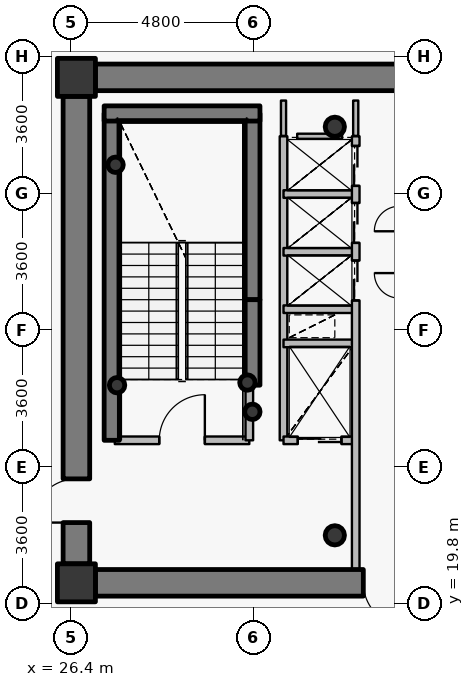
"""IFC4 building model, lengths in metres.
Left out: names, types, materials, properties, quantities, classifications, styles, units other than length and angle.
Written with IfcOpenShell. Run it as: python <this file> out.ifc"""

import sys

from ifc_helpers import new_model, si_unit, direction, frame, frame_2d, origin, origin_2d, place, context, subcontext, project, spatial, rectangle, hollow_circle, extrude, source, transform, mapped, element, fill, save


model = new_model("IFC4")
c1 = context("Model", 3, precision=1e-05, world=origin(), true_north=direction((0.0, 1.0)))
c2 = subcontext(c1, "Body", "Model", "MODEL_VIEW")
j1 = project(units=[si_unit("LENGTHUNIT", "METRE"), si_unit("PLANEANGLEUNIT", "RADIAN")], contexts=[c1])
p1 = place(None, origin())
s1 = spatial("IfcSite", under=j1, at=p1, CompositionType="ELEMENT")
p2 = place(p1, origin())
s2 = spatial("IfcBuilding", under=s1, at=p2, CompositionType="ELEMENT")
p3 = place(p2, frame((0.0, 0.0, 225.3)))
s3 = spatial("IfcBuildingStorey", under=s2, at=p3, CompositionType="ELEMENT", Elevation=225.3)
for number, where, z_axis, x_axis in (
    (1, (26.55, 20.35, 0.0), (0.0, 0.0, 1.0), (1.0, 0.0, 0.0)),
    (2, (26.55, 33.65, 0.0), (0.0, 0.0, 1.0), (1.0, 0.0, 0.0)),
):
    element("IfcColumn", number, at=place(p3, frame(where, z_axis=z_axis, x_axis=x_axis)), inside=s3, PredefinedType="COLUMN", context=c2, shape_type="SweptSolid", body=[
        extrude(rectangle(XDim=1.0, YDim=1.0, at=origin_2d()), origin(), (0.0, 0.0, 1.0), 3.75),
    ])
for number, where, z_axis, x_axis in (
    (3, (33.35, 21.6, 0.0), (0.0, 0.0, 1.0), (1.0, 0.0, 0.0)),
    (4, (33.35, 32.35, 0.0), (0.0, 0.0, 1.0), (1.0, 0.0, 0.0)),
):
    element("IfcColumn", number, at=place(p3, frame(where, z_axis=z_axis, x_axis=x_axis)), inside=s3, PredefinedType="COLUMN", context=c2, shape_type="SweptSolid", body=[
        extrude(hollow_circle(Radius=0.254, WallThickness=0.02, at=origin_2d()), origin(), (0.0, 0.0, 1.0), 3.75),
    ])
p4 = place(p3, frame((27.48, 24.1, 0.0), z_axis=(0.0, 0.0, 1.0), x_axis=(0.0, 1.0, 0.0)))
e5 = element("IfcWall", 5, at=p4, inside=s3, PredefinedType="SHEAR", context=c2, shape_type="SweptSolid", body=[
    extrude(rectangle(XDim=8.6, YDim=0.4, at=frame_2d((4.3, 0.0))), origin(), (0.0, 0.0, 1.0), 3.75),
])
p5 = place(p3, frame((31.18, 27.8, 0.0), z_axis=(0.0, 0.0, 1.0), x_axis=(0.0, 1.0, 0.0)))
e6 = element("IfcWall", 6, at=p5, inside=s3, PredefinedType="SHEAR", context=c2, shape_type="SweptSolid", body=[
    extrude(rectangle(XDim=4.9, YDim=0.4, at=frame_2d((2.45, 0.0))), origin(), (0.0, 0.0, 1.0), 3.75),
])
p6 = place(p3, frame((27.28, 32.7, 0.0), z_axis=(0.0, 0.0, 1.0), x_axis=(1.0, 0.0, 0.0)))
e7 = element("IfcWall", 7, at=p6, inside=s3, PredefinedType="SHEAR", context=c2, shape_type="SweptSolid", body=[
    extrude(rectangle(XDim=4.1, YDim=0.4, at=frame_2d((2.05, 0.0))), origin(), (0.0, 0.0, 1.0), 3.75),
])
for number, where, z_axis, x_axis in (
    (8, (27.58, 31.35, 0.0), (0.0, 0.0, 1.0), (1.0, 0.0, 0.0)),
    (9, (31.05, 25.62, 0.0), (0.0, 0.0, 1.0), (1.0, 0.0, 0.0)),
    (10, (31.18, 24.85, 0.0), (0.0, 0.0, 1.0), (1.0, 0.0, 0.0)),
    (11, (27.62, 25.55, 0.0), (0.0, 0.0, 1.0), (1.0, 0.0, 0.0)),
):
    element("IfcColumn", number, at=place(p3, frame(where, z_axis=z_axis, x_axis=x_axis)), inside=s3, PredefinedType="COLUMN", context=c2, shape_type="SweptSolid", body=[
        extrude(hollow_circle(Radius=0.203, WallThickness=0.016, at=origin_2d()), origin(), (0.0, 0.0, 1.0), 3.75),
    ])
p7 = place(p3, frame((27.05, 33.65, 0.0), z_axis=(0.0, 0.0, 1.0), x_axis=(1.0, 0.0, 0.0)))
e12 = element("IfcWall", 12, at=p7, inside=s3, PredefinedType="SHEAR", context=c2, shape_type="SweptSolid", body=[
    extrude(rectangle(XDim=17.9, YDim=0.7, at=frame_2d((8.95, 0.0))), origin(), (0.0, 0.0, 1.0), 3.05),
])
p8 = place(p7, frame((13.675, 0.0, 0.0)))
e13 = element("IfcOpeningElement", 13, at=p8, cuts=e12, PredefinedType="OPENING", context=c2, shape_type="SweptSolid", body=[
    extrude(rectangle(XDim=1.15, YDim=2.15, at=origin_2d()), frame((0.575, 0.36, 1.075), z_axis=(0.0, -1.0, 0.0), x_axis=(1.0, 0.0, 0.0)), (0.0, 0.0, 1.0), 0.72),
])
p9 = place(p3, frame((44.95, 20.35, 0.0), z_axis=(0.0, 0.0, 1.0), x_axis=(-1.0, 0.0, 0.0)))
e14 = element("IfcWall", 14, at=p9, inside=s3, PredefinedType="SHEAR", context=c2, shape_type="SweptSolid", body=[
    extrude(rectangle(XDim=17.9, YDim=0.7, at=frame_2d((8.95, 0.0))), origin(), (0.0, 0.0, 1.0), 3.05),
])
p10 = place(p9, frame((9.7, 0.0, 0.0)))
e15 = element("IfcOpeningElement", 15, at=p10, cuts=e14, PredefinedType="OPENING", context=c2, shape_type="SweptSolid", body=[
    extrude(rectangle(XDim=1.15, YDim=2.15, at=origin_2d()), frame((0.575, 0.36, 1.075), z_axis=(0.0, -1.0, 0.0), x_axis=(1.0, 0.0, 0.0)), (0.0, 0.0, 1.0), 0.72),
])
p11 = place(p3, frame((26.55, 20.85, 0.0), z_axis=(0.0, 0.0, 1.0), x_axis=(0.0, 1.0, 0.0)))
e16 = element("IfcWall", 16, at=p11, inside=s3, PredefinedType="SHEAR", context=c2, shape_type="SweptSolid", body=[
    extrude(rectangle(XDim=12.3, YDim=0.7, at=frame_2d((6.15, 0.0))), origin(), (0.0, 0.0, 1.0), 3.05),
])
p12 = place(p11, frame((1.085, 0.0, 0.0)))
e17 = element("IfcOpeningElement", 17, at=p12, cuts=e16, PredefinedType="OPENING", context=c2, shape_type="SweptSolid", body=[
    extrude(rectangle(XDim=1.15, YDim=2.15, at=origin_2d()), frame((0.575, 0.36, 1.075), z_axis=(0.0, -1.0, 0.0), x_axis=(1.0, 0.0, 0.0)), (0.0, 0.0, 1.0), 0.72),
])
p13 = place(p3, frame((31.18, 25.55, 0.0), z_axis=(0.0, 0.0, 1.0), x_axis=(0.0, 1.0, 0.0)))
e18 = element("IfcWall", 18, at=p13, inside=s3, PredefinedType="SHEAR", context=c2, shape_type="SweptSolid", body=[
    extrude(rectangle(XDim=2.25, YDim=0.4, at=frame_2d((1.125, 0.0))), origin(), (0.0, 0.0, 1.0), 3.1),
])
p14 = place(p3, frame((27.56, 24.1, 0.0), z_axis=(0.0, 0.0, 1.0), x_axis=(1.0, 0.0, 0.0)))
e19 = element("IfcWall", 19, at=p14, inside=s3, PredefinedType="PARTITIONING", context=c2, shape_type="SweptSolid", body=[
    extrude(rectangle(XDim=3.54, YDim=0.2, at=frame_2d((1.77, 0.0))), origin(), (0.0, 0.0, 1.0), 3.5),
])
p15 = place(p14, frame((1.17, 0.0, 0.0)))
e20 = element("IfcOpeningElement", 20, at=p15, cuts=e19, PredefinedType="OPENING", context=c2, shape_type="SweptSolid", body=[
    extrude(rectangle(XDim=1.2, YDim=2.15, at=origin_2d()), frame((0.6, 0.11, 1.075), z_axis=(0.0, -1.0, 0.0), x_axis=(1.0, 0.0, 0.0)), (0.0, 0.0, 1.0), 0.22),
])
p16 = place(p3, frame((31.1, 24.1, 0.0), z_axis=(0.0, 0.0, 1.0), x_axis=(0.0, 1.0, 0.0)))
e21 = element("IfcWall", 21, at=p16, inside=s3, PredefinedType="PARTITIONING", context=c2, shape_type="SweptSolid", body=[
    extrude(rectangle(XDim=1.44, YDim=0.2, at=frame_2d((0.72, 0.0))), origin(), (0.0, 0.0, 1.0), 3.5),
])
p17 = place(p3, frame((32.0, 24.1, 0.0), z_axis=(0.0, 0.0, 1.0), x_axis=(0.0, 1.0, 0.0)))
e22 = element("IfcWall", 22, at=p17, inside=s3, PredefinedType="PARTITIONING", context=c2, shape_type="SweptSolid", body=[
    extrude(rectangle(XDim=8.0, YDim=0.2, at=frame_2d((4.0, 0.0))), origin(), (0.0, 0.0, 1.0), 3.5),
])
p18 = place(p3, frame((32.0, 24.1, 0.0), z_axis=(0.0, 0.0, 1.0), x_axis=(1.0, 0.0, 0.0)))
e23 = element("IfcWall", 23, at=p18, inside=s3, PredefinedType="PARTITIONING", context=c2, shape_type="SweptSolid", body=[
    extrude(rectangle(XDim=1.9, YDim=0.2, at=frame_2d((0.95, 0.0))), origin(), (0.0, 0.0, 1.0), 3.085),
])
p19 = place(p18, frame((0.375, 0.0, 0.0)))
e24 = element("IfcOpeningElement", 24, at=p19, cuts=e23, PredefinedType="OPENING", context=c2, shape_type="SweptSolid", body=[
    extrude(rectangle(XDim=1.15, YDim=2.15, at=origin_2d()), frame((0.575, 0.11, 1.075), z_axis=(0.0, -1.0, 0.0), x_axis=(1.0, 0.0, 0.0)), (0.0, 0.0, 1.0), 0.22),
])
for number, where, z_axis, x_axis in (
    (25, (32.0, 26.65, 0.0), (0.0, 0.0, 1.0), (1.0, 0.0, 0.0)),
    (26, (32.0, 27.55, 0.0), (0.0, 0.0, 1.0), (1.0, 0.0, 0.0)),
    (27, (32.0, 29.06, 0.0), (0.0, 0.0, 1.0), (1.0, 0.0, 0.0)),
    (28, (32.0, 30.58, 0.0), (0.0, 0.0, 1.0), (1.0, 0.0, 0.0)),
):
    element("IfcWall", number, at=place(p3, frame(where, z_axis=z_axis, x_axis=x_axis)), inside=s3, PredefinedType="PARTITIONING", context=c2, shape_type="SweptSolid", body=[
        extrude(rectangle(XDim=1.9, YDim=0.2, at=frame_2d((0.95, 0.0))), origin(), (0.0, 0.0, 1.0), 3.085),
    ])
p20 = place(p3, frame((33.9, 20.7, 0.0), z_axis=(0.0, 0.0, 1.0), x_axis=(0.0, 1.0, 0.0)))
e29 = element("IfcWall", 29, at=p20, inside=s3, PredefinedType="PARTITIONING", context=c2, shape_type="SweptSolid", body=[
    extrude(rectangle(XDim=11.4, YDim=0.2, at=frame_2d((5.7, 0.0))), origin(), (0.0, 0.0, 1.0), 3.085),
])
p21 = place(p20, frame((7.08, 0.0, 0.0)))
e30 = element("IfcOpeningElement", 30, at=p21, cuts=e29, PredefinedType="OPENING", context=c2, shape_type="SweptSolid", body=[
    extrude(rectangle(XDim=1.05, YDim=2.15, at=origin_2d()), frame((0.525, 0.11, 1.075), z_axis=(0.0, -1.0, 0.0), x_axis=(1.0, 0.0, 0.0)), (0.0, 0.0, 1.0), 0.22),
])
p22 = place(p20, frame((8.595, 0.0, 0.0)))
e31 = element("IfcOpeningElement", 31, at=p22, cuts=e29, PredefinedType="OPENING", context=c2, shape_type="SweptSolid", body=[
    extrude(rectangle(XDim=1.05, YDim=2.15, at=origin_2d()), frame((0.525, 0.11, 1.075), z_axis=(0.0, -1.0, 0.0), x_axis=(1.0, 0.0, 0.0)), (0.0, 0.0, 1.0), 0.22),
])
p23 = place(p20, frame((10.095, 0.0, 0.0)))
e32 = element("IfcOpeningElement", 32, at=p23, cuts=e29, PredefinedType="OPENING", context=c2, shape_type="SweptSolid", body=[
    extrude(rectangle(XDim=1.05, YDim=2.15, at=origin_2d()), frame((0.525, 0.11, 1.075), z_axis=(0.0, -1.0, 0.0), x_axis=(1.0, 0.0, 0.0)), (0.0, 0.0, 1.0), 0.22),
])
p24 = place(p3, frame((32.36, 32.1, 0.0), z_axis=(0.0, 0.0, 1.0), x_axis=(1.0, 0.0, 0.0)))
e33 = element("IfcWall", 33, at=p24, inside=s3, PredefinedType="PARTITIONING", context=c2, shape_type="SweptSolid", body=[
    extrude(rectangle(XDim=1.18, YDim=0.135, at=frame_2d((0.59, 0.0))), origin(), (0.0, 0.0, 1.0), 3.085),
])
p25 = place(p3, frame((32.0, 33.04, 0.0), z_axis=(0.0, 0.0, 1.0), x_axis=(0.0, -1.0, 0.0)))
e34 = element("IfcWall", 34, at=p25, inside=s3, PredefinedType="PARTITIONING", context=c2, shape_type="SweptSolid", body=[
    extrude(rectangle(XDim=0.93, YDim=0.135, at=frame_2d((0.465, 0.0))), origin(), (0.0, 0.0, 1.0), 3.035),
])
p26 = place(p3, frame((33.9, 32.11, 0.0), z_axis=(0.0, 0.0, 1.0), x_axis=(0.0, 1.0, 0.0)))
e35 = element("IfcWall", 35, at=p26, inside=s3, PredefinedType="PARTITIONING", context=c2, shape_type="SweptSolid", body=[
    extrude(rectangle(XDim=0.93, YDim=0.135, at=frame_2d((0.465, 0.0))), origin(), (0.0, 0.0, 1.0), 3.085),
])
p27 = place(p3, frame((27.04, 34.0, 0.0), z_axis=(0.0, 0.0, 1.0), x_axis=(-1.0, 0.0, 0.0)))
e36 = element("IfcWall", 36, at=p27, inside=s3, PredefinedType="PARTITIONING", context=c2, shape_type="SweptSolid", body=[
    extrude(rectangle(XDim=0.84, YDim=0.135, at=frame_2d((0.42, 0.0))), origin(), (0.0, 0.0, 1.0), 2.935),
])
p28 = place(p3, frame((26.2, 33.692, 0.0), z_axis=(0.0, 0.0, 1.0), x_axis=(0.0, -1.0, 0.0)))
e37 = element("IfcWall", 37, at=p28, inside=s3, PredefinedType="PARTITIONING", context=c2, shape_type="SweptSolid", body=[
    extrude(rectangle(XDim=0.532, YDim=0.135, at=frame_2d((0.266, 0.0))), origin(), (0.0, 0.0, 1.0), 3.5),
])
p29 = place(p3, frame((26.2, 20.84, 0.0), z_axis=(0.0, 0.0, 1.0), x_axis=(0.0, -1.0, 0.0)))
e38 = element("IfcWall", 38, at=p29, inside=s3, PredefinedType="PARTITIONING", context=c2, shape_type="SweptSolid", body=[
    extrude(rectangle(XDim=0.84, YDim=0.135, at=frame_2d((0.42, 0.0))), origin(), (0.0, 0.0, 1.0), 3.5),
])
p30 = place(p3, frame((26.508, 20.0, 0.0), z_axis=(0.0, 0.0, 1.0), x_axis=(1.0, 0.0, 0.0)))
e39 = element("IfcWall", 39, at=p30, inside=s3, PredefinedType="PARTITIONING", context=c2, shape_type="SweptSolid", body=[
    extrude(rectangle(XDim=0.532, YDim=0.135, at=frame_2d((0.266, 0.0))), origin(), (0.0, 0.0, 1.0), 2.935),
])
m1 = source(origin(), c2, "Body", "SweptSolid", [
    extrude(rectangle(XDim=1.15, YDim=2.15, at=origin_2d()), frame((0.575, 0.025, 1.075), z_axis=(0.0, -1.0, 0.0), x_axis=(1.0, 0.0, 0.0)), (0.0, 0.0, 1.0), 0.05),
])
p31 = place(p12, origin())
e40 = element("IfcDoor", 40, at=p31, inside=s3, OperationType="SINGLE_SWING_LEFT", PredefinedType="DOOR", context=c2, shape_type="MappedRepresentation", body=[
    mapped(m1, transform((0.0, 0.0, 0.0), x_axis=(1.0, 0.0, 0.0), y_axis=(0.0, 1.0, 0.0), z_axis=(0.0, 0.0, 1.0), scale=1.0)),
])
fill(e17, e40)
p32 = place(p10, origin())
e41 = element("IfcDoor", 41, at=p32, inside=s3, OperationType="SINGLE_SWING_LEFT", PredefinedType="DOOR", context=c2, shape_type="MappedRepresentation", body=[
    mapped(m1, transform((0.0, 0.0, 0.0), x_axis=(1.0, 0.0, 0.0), y_axis=(0.0, 1.0, 0.0), z_axis=(0.0, 0.0, 1.0), scale=1.0)),
])
fill(e15, e41)
m2 = source(origin(), c2, "Body", "SweptSolid", [
    extrude(rectangle(XDim=1.2, YDim=2.15, at=origin_2d()), frame((0.6, 0.025, 1.075), z_axis=(0.0, -1.0, 0.0), x_axis=(1.0, 0.0, 0.0)), (0.0, 0.0, 1.0), 0.05),
])
p33 = place(p15, origin())
e42 = element("IfcDoor", 42, at=p33, inside=s3, OperationType="SINGLE_SWING_RIGHT", PredefinedType="DOOR", context=c2, shape_type="MappedRepresentation", body=[
    mapped(m2, transform((0.0, 0.0, 0.0), x_axis=(1.0, 0.0, 0.0), y_axis=(0.0, 1.0, 0.0), z_axis=(0.0, 0.0, 1.0), scale=1.0)),
])
fill(e20, e42)
m3 = source(origin(), c2, "Body", "SweptSolid", [
    extrude(rectangle(XDim=1.15, YDim=2.15, at=origin_2d()), frame((0.575, 0.025, 1.075), z_axis=(0.0, -1.0, 0.0), x_axis=(1.0, 0.0, 0.0)), (0.0, 0.0, 1.0), 0.05),
])
p34 = place(p19, origin())
e43 = element("IfcDoor", 43, at=p34, inside=s3, OperationType="DOUBLE_DOOR_SLIDING", PredefinedType="USERDEFINED", context=c2, shape_type="MappedRepresentation", body=[
    mapped(m3, transform((0.0, 0.0, 0.0), x_axis=(1.0, 0.0, 0.0), y_axis=(0.0, 1.0, 0.0), z_axis=(0.0, 0.0, 1.0), scale=1.0)),
])
fill(e24, e43)
m4 = source(origin(), c2, "Body", "SweptSolid", [
    extrude(rectangle(XDim=1.05, YDim=2.15, at=origin_2d()), frame((0.525, 0.025, 1.075), z_axis=(0.0, -1.0, 0.0), x_axis=(1.0, 0.0, 0.0)), (0.0, 0.0, 1.0), 0.05),
])
p35 = place(p21, origin())
e44 = element("IfcDoor", 44, at=p35, inside=s3, OperationType="DOUBLE_DOOR_SLIDING", PredefinedType="USERDEFINED", context=c2, shape_type="MappedRepresentation", body=[
    mapped(m4, transform((0.0, 0.0, 0.0), x_axis=(1.0, 0.0, 0.0), y_axis=(0.0, 1.0, 0.0), z_axis=(0.0, 0.0, 1.0), scale=1.0)),
])
fill(e30, e44)
p36 = place(p22, origin())
e45 = element("IfcDoor", 45, at=p36, inside=s3, OperationType="DOUBLE_DOOR_SLIDING", PredefinedType="USERDEFINED", context=c2, shape_type="MappedRepresentation", body=[
    mapped(m4, transform((0.0, 0.0, 0.0), x_axis=(1.0, 0.0, 0.0), y_axis=(0.0, 1.0, 0.0), z_axis=(0.0, 0.0, 1.0), scale=1.0)),
])
fill(e31, e45)
p37 = place(p23, origin())
e46 = element("IfcDoor", 46, at=p37, inside=s3, OperationType="DOUBLE_DOOR_SLIDING", PredefinedType="USERDEFINED", context=c2, shape_type="MappedRepresentation", body=[
    mapped(m4, transform((0.0, 0.0, 0.0), x_axis=(1.0, 0.0, 0.0), y_axis=(0.0, 1.0, 0.0), z_axis=(0.0, 0.0, 1.0), scale=1.0)),
])
fill(e32, e46)
save(model, sys.argv[1])
